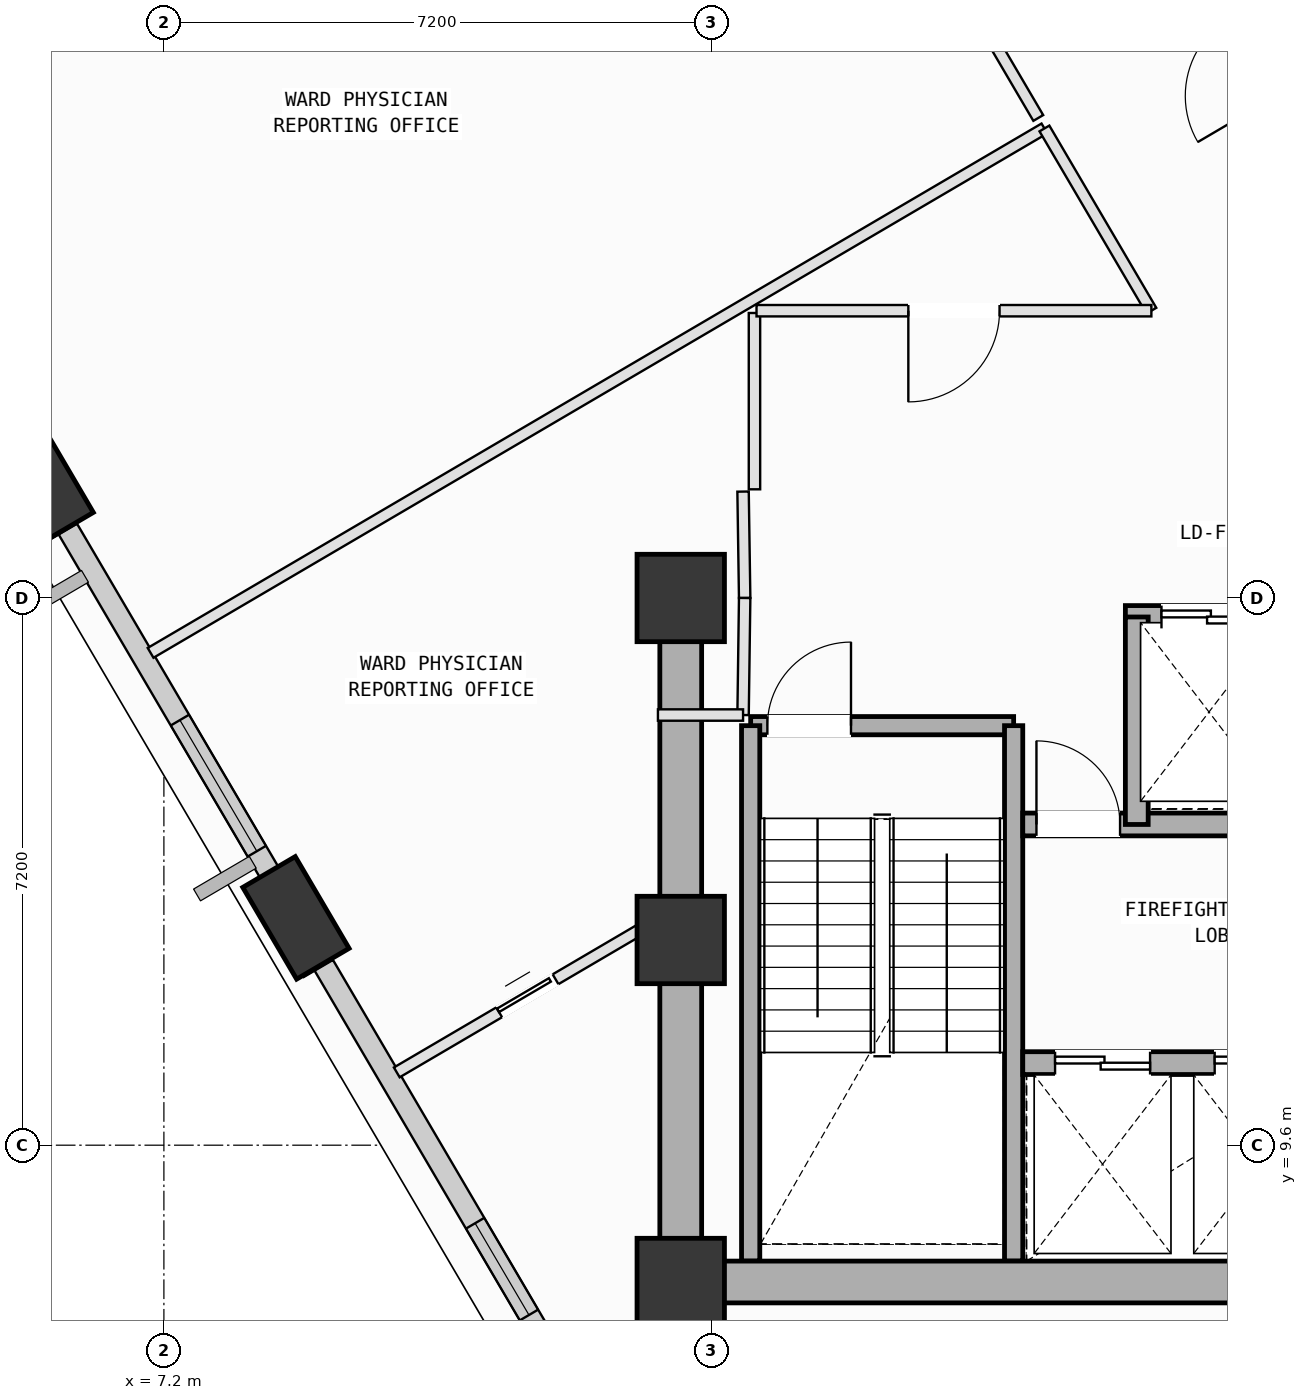
"""IFC4 building model, lengths in metres.
Left out: names, types, materials, properties, quantities, classifications, styles, units other than length and angle.
Written with IfcOpenShell. Run it as: python <this file> out.ifc"""

import sys

from ifc_helpers import new_model, si_unit, direction, frame, frame_2d, origin, origin_2d, place, context, subcontext, project, spatial, rectangle, extrude, element, fill, save


model = new_model("IFC4")
c1 = context("Model", 3, precision=1e-05, world=origin(), true_north=direction((0.0, 1.0)))
c2 = subcontext(c1, "Body", "Model", "MODEL_VIEW")
j1 = project(units=[si_unit("LENGTHUNIT", "METRE"), si_unit("PLANEANGLEUNIT", "RADIAN")], contexts=[c1])
p1 = place(None, origin())
s1 = spatial("IfcSite", under=j1, at=p1, CompositionType="ELEMENT")
p2 = place(p1, origin())
s2 = spatial("IfcBuilding", under=s1, at=p2, CompositionType="ELEMENT")
p3 = place(p2, frame((0.0, 0.0, 153.8)))
s3 = spatial("IfcBuildingStorey", under=s2, at=p3, CompositionType="ELEMENT", Elevation=153.8)
for number, where, z_axis, x_axis in (
    (1, (14.0, 7.8, 0.0), (0.0, 0.0, 1.0), (1.0, 0.0, 0.0)),
    (2, (14.0, 12.3, 0.0), (0.0, 0.0, 1.0), (1.0, 0.0, 0.0)),
    (3, (14.0, 16.8, 0.0), (0.0, 0.0, 1.0), (1.0, 0.0, 0.0)),
):
    element("IfcColumn", number, at=place(p3, frame(where, z_axis=z_axis, x_axis=x_axis)), inside=s3, PredefinedType="COLUMN", context=c2, shape_type="SweptSolid", body=[
        extrude(rectangle(XDim=1.15, YDim=1.15, at=origin_2d()), origin(), (0.0, 0.0, 1.0), 4.0),
    ])
p4 = place(p3, frame((5.572, 18.327, 0.002), z_axis=(0.027600932287, -0.115135317539, 0.992966287037), x_axis=(-0.69174719103, 0.714882822887, 0.102119406791)))
e4 = element("IfcColumn", 4, at=p4, inside=s3, PredefinedType="COLUMN", context=c2, shape_type="SweptSolid", body=[
    extrude(rectangle(XDim=1.4, YDim=0.8, at=origin_2d()), origin(), (0.0, 0.0, 1.0), 4.025),
])
p5 = place(p3, frame((8.937, 12.591, 0.002), z_axis=(0.051167990151, -0.101122030358, 0.993557331894), x_axis=(-0.838431150667, 0.536170027731, 0.097749204363)))
e5 = element("IfcColumn", 5, at=p5, inside=s3, PredefinedType="COLUMN", context=c2, shape_type="SweptSolid", body=[
    extrude(rectangle(XDim=1.4, YDim=0.8, at=origin_2d()), origin(), (0.0, 0.0, 1.0), 4.022),
])
p6 = place(p3, frame((8.802, 12.823, 0.0), z_axis=(0.0, 0.0, 1.0), x_axis=(-0.506043695411, 0.862507842477, 0.0)))
e6 = element("IfcWall", 6, at=p6, inside=s3, PredefinedType="SOLIDWALL", context=c2, shape_type="SweptSolid", body=[
    extrude(rectangle(XDim=5.662, YDim=0.28, at=frame_2d((2.831, 0.0))), origin(), (0.0, 0.0, 1.0), 3.165),
])
p7 = place(p6, frame((0.748, 0.0, 0.75)))
e7 = element("IfcOpeningElement", 7, at=p7, cuts=e6, PredefinedType="OPENING", context=c2, shape_type="SweptSolid", body=[
    extrude(rectangle(XDim=2.0, YDim=1.95, at=frame_2d((1.0, 0.975))), frame((0.0, 0.15, 0.0), z_axis=(0.0, -1.0, 0.0), x_axis=(1.0, 0.0, 0.0)), (0.0, 0.0, 1.0), 0.3),
])
p8 = place(p3, frame((13.028, 5.619, 0.0), z_axis=(0.0, 0.0, 1.0), x_axis=(-0.506051462326, 0.862503285488, 0.0)))
e8 = element("IfcWall", 8, at=p8, inside=s3, PredefinedType="SOLIDWALL", context=c2, shape_type="SweptSolid", body=[
    extrude(rectangle(XDim=7.36, YDim=0.28, at=frame_2d((3.68, 0.0))), origin(), (0.0, 0.0, 1.0), 3.165),
])
p9 = place(p8, frame((2.025, 0.0, 0.75)))
e9 = element("IfcOpeningElement", 9, at=p9, cuts=e8, PredefinedType="OPENING", context=c2, shape_type="SweptSolid", body=[
    extrude(rectangle(XDim=1.4, YDim=1.85, at=frame_2d((0.7, 0.925))), frame((0.0, 0.15, 0.0), z_axis=(0.0, -1.0, 0.0), x_axis=(1.0, 0.0, 0.0)), (0.0, 0.0, 1.0), 0.3),
])
p10 = place(p3, frame((14.92, 15.12, 0.0), z_axis=(0.0, 0.0, 1.0), x_axis=(1.0, 0.0, 0.0)))
e10 = element("IfcWall", 10, at=p10, inside=s3, PredefinedType="SOLIDWALL", context=c2, shape_type="SweptSolid", body=[
    extrude(rectangle(XDim=3.46, YDim=0.24, at=frame_2d((1.73, 0.0))), origin(), (0.0, 0.0, 1.0), 3.78),
])
p11 = place(p10, frame((0.22, 0.0, 0.0)))
e11 = element("IfcOpeningElement", 11, at=p11, cuts=e10, PredefinedType="OPENING", context=c2, shape_type="SweptSolid", body=[
    extrude(rectangle(XDim=1.1, YDim=2.15, at=frame_2d((0.55, 1.075))), frame((0.0, 0.13, 0.0), z_axis=(0.0, -1.0, 0.0), x_axis=(1.0, 0.0, 0.0)), (0.0, 0.0, 1.0), 0.26),
])
for number, where, z_axis, x_axis in (
    (12, (18.38, 15.12, 0.0), (0.0, 0.0, 1.0), (0.0, -1.0, 0.0)),
    (13, (14.92, 8.075, 0.0), (0.0, 0.0, 1.0), (0.0, 1.0, 0.0)),
):
    element("IfcWall", number, at=place(p3, frame(where, z_axis=z_axis, x_axis=x_axis)), inside=s3, PredefinedType="SOLIDWALL", context=c2, shape_type="SweptSolid", body=[
        extrude(rectangle(XDim=7.045, YDim=0.24, at=frame_2d((3.522, 0.0))), origin(), (0.0, 0.0, 1.0), 3.78),
    ])
p12 = place(p3, frame((14.0, 7.8, 0.0), z_axis=(0.0, 0.0, 1.0), x_axis=(1.0, 0.0, 0.0)))
e14 = element("IfcWall", 14, at=p12, inside=s3, PredefinedType="SHEAR", context=c2, shape_type="SweptSolid", body=[
    extrude(rectangle(XDim=10.8, YDim=0.55, at=frame_2d((5.4, 0.0))), origin(), (0.0, 0.0, 1.0), 3.78),
])
p13 = place(p3, frame((14.0, 16.8, 0.0), z_axis=(0.0, 0.0, 1.0), x_axis=(0.0, -1.0, 0.0)))
e15 = element("IfcWall", 15, at=p13, inside=s3, PredefinedType="SHEAR", context=c2, shape_type="SweptSolid", body=[
    extrude(rectangle(XDim=9.0, YDim=0.55, at=frame_2d((4.5, 0.0))), origin(), (0.0, 0.0, 1.0), 3.78),
])
p14 = place(p3, frame((19.85, 16.55, 0.0), z_axis=(0.0, 0.0, 1.0), x_axis=(1.0, 0.0, 0.0)))
e16 = element("IfcWall", 16, at=p14, inside=s3, PredefinedType="SOLIDWALL", context=c2, shape_type="SweptSolid", body=[
    extrude(rectangle(XDim=4.375, YDim=0.3, at=frame_2d((2.188, 0.0))), origin(), (0.0, 0.0, 1.0), 3.78),
])
p15 = place(p14, frame((0.475, 0.0, 0.0)))
e17 = element("IfcOpeningElement", 17, at=p15, cuts=e16, PredefinedType="OPENING", context=c2, shape_type="SweptSolid", body=[
    extrude(rectangle(XDim=1.25, YDim=2.18, at=frame_2d((0.625, 1.09))), frame((0.0, 0.16, 0.0), z_axis=(0.0, -1.0, 0.0), x_axis=(1.0, 0.0, 0.0)), (0.0, 0.0, 1.0), 0.32),
])
p16 = place(p14, frame((2.49, 0.0, 0.0)))
e18 = element("IfcOpeningElement", 18, at=p16, cuts=e16, PredefinedType="OPENING", context=c2, shape_type="SweptSolid", body=[
    extrude(rectangle(XDim=1.02, YDim=2.12, at=frame_2d((0.51, 1.06))), frame((0.0, 0.16, 0.0), z_axis=(0.0, -1.0, 0.0), x_axis=(1.0, 0.0, 0.0)), (0.0, 0.0, 1.0), 0.32),
])
p17 = place(p3, frame((18.5, 10.68, 0.0), z_axis=(0.0, 0.0, 1.0), x_axis=(1.0, 0.0, 0.0)))
e19 = element("IfcWall", 19, at=p17, inside=s3, PredefinedType="SOLIDWALL", context=c2, shape_type="SweptSolid", body=[
    extrude(rectangle(XDim=5.3, YDim=0.3, at=frame_2d((2.65, 0.0))), origin(), (0.0, 0.0, 1.0), 3.78),
])
p18 = place(p17, frame((4.22, 0.0, 0.0)))
e20 = element("IfcOpeningElement", 20, at=p18, cuts=e19, PredefinedType="OPENING", context=c2, shape_type="SweptSolid", body=[
    extrude(rectangle(XDim=0.86, YDim=2.06, at=frame_2d((0.43, 1.03))), frame((0.0, 0.16, 0.0), z_axis=(0.0, -1.0, 0.0), x_axis=(1.0, 0.0, 0.0)), (0.0, 0.0, 1.0), 0.32),
])
p19 = place(p17, frame((0.425, 0.0, 0.0)))
e21 = element("IfcOpeningElement", 21, at=p19, cuts=e19, PredefinedType="OPENING", context=c2, shape_type="SweptSolid", body=[
    extrude(rectangle(XDim=1.25, YDim=2.18, at=frame_2d((0.625, 1.09))), frame((0.0, 0.16, 0.0), z_axis=(0.0, -1.0, 0.0), x_axis=(1.0, 0.0, 0.0)), (0.0, 0.0, 1.0), 0.32),
])
p20 = place(p17, frame((2.525, 0.0, 0.0)))
e22 = element("IfcOpeningElement", 22, at=p20, cuts=e19, PredefinedType="OPENING", context=c2, shape_type="SweptSolid", body=[
    extrude(rectangle(XDim=1.25, YDim=2.18, at=frame_2d((0.625, 1.09))), frame((0.0, 0.16, 0.0), z_axis=(0.0, -1.0, 0.0), x_axis=(1.0, 0.0, 0.0)), (0.0, 0.0, 1.0), 0.32),
])
p21 = place(p3, frame((18.5, 13.82, 0.0), z_axis=(0.0, 0.0, 1.0), x_axis=(1.0, 0.0, 0.0)))
e23 = element("IfcWall", 23, at=p21, inside=s3, PredefinedType="SOLIDWALL", context=c2, shape_type="SweptSolid", body=[
    extrude(rectangle(XDim=5.3, YDim=0.3, at=frame_2d((2.65, 0.0))), origin(), (0.0, 0.0, 1.0), 3.78),
])
p22 = place(p21, frame((0.18, 0.0, 0.0)))
e24 = element("IfcOpeningElement", 24, at=p22, cuts=e23, PredefinedType="OPENING", context=c2, shape_type="SweptSolid", body=[
    extrude(rectangle(XDim=1.1, YDim=2.15, at=frame_2d((0.55, 1.075))), frame((0.0, 0.16, 0.0), z_axis=(0.0, -1.0, 0.0), x_axis=(1.0, 0.0, 0.0)), (0.0, 0.0, 1.0), 0.32),
])
p23 = place(p3, frame((20.0, 13.82, 0.0), z_axis=(0.0, 0.0, 1.0), x_axis=(0.0, 1.0, 0.0)))
e25 = element("IfcWall", 25, at=p23, inside=s3, PredefinedType="SOLIDWALL", context=c2, shape_type="SweptSolid", body=[
    extrude(rectangle(XDim=2.73, YDim=0.3, at=frame_2d((1.365, 0.0))), origin(), (0.0, 0.0, 1.0), 3.78),
])
p24 = place(p3, frame((23.214, 7.675, 0.0), z_axis=(0.0, 0.0, 1.0), x_axis=(-0.862480430276, -0.506090414245, 0.0)))
e26 = element("IfcWall", 26, at=p24, inside=s3, PredefinedType="PARTITIONING", context=c2, shape_type="SweptSolid", body=[
    extrude(rectangle(XDim=9.712, YDim=0.15, at=frame_2d((4.856, 0.0))), origin(), (0.0, 0.0, 1.0), 3.78),
])
p25 = place(p3, frame((10.264, 10.558, 0.0), z_axis=(0.0, 0.0, 1.0), x_axis=(0.862518129621, 0.506026161453, 0.0)))
e27 = element("IfcWall", 27, at=p25, inside=s3, PredefinedType="PARTITIONING", context=c2, shape_type="SweptSolid", body=[
    extrude(rectangle(XDim=3.984, YDim=0.15, at=frame_2d((1.992, 0.0))), origin(), (0.0, 0.0, 1.0), 3.78),
])
p26 = place(p25, frame((1.562, 0.0, 0.0)))
e28 = element("IfcOpeningElement", 28, at=p26, cuts=e27, PredefinedType="OPENING", context=c2, shape_type="SweptSolid", body=[
    extrude(rectangle(XDim=0.86, YDim=2.06, at=frame_2d((0.43, 1.03))), frame((0.0, 0.085, 0.0), z_axis=(0.0, -1.0, 0.0), x_axis=(1.0, 0.0, 0.0)), (0.0, 0.0, 1.0), 0.17),
])
p27 = place(p3, frame((14.97, 20.55, 0.0), z_axis=(0.0, 0.0, 1.0), x_axis=(0.0, -1.0, 0.0)))
e29 = element("IfcWall", 29, at=p27, inside=s3, PredefinedType="PARTITIONING", context=c2, shape_type="SweptSolid", body=[
    extrude(rectangle(XDim=2.32, YDim=0.15, at=frame_2d((1.16, 0.0))), origin(), (0.0, 0.0, 1.0), 3.78),
])
p28 = place(p3, frame((14.82, 18.2, 0.0), z_axis=(0.0, 0.0, 1.0), x_axis=(0.01499656939, -0.99988754513, 0.0)))
e30 = element("IfcWall", 30, at=p28, inside=s3, PredefinedType="PARTITIONING", context=c2, shape_type="SweptSolid", body=[
    extrude(rectangle(XDim=1.4, YDim=0.15, at=frame_2d((0.7, 0.0))), origin(), (0.0, 0.0, 1.0), 3.78),
])
p29 = place(p3, frame((14.841, 16.8, 0.0), z_axis=(0.0, 0.0, 1.0), x_axis=(-0.01363221443, -0.999907077048, 0.0)))
e31 = element("IfcWall", 31, at=p29, inside=s3, PredefinedType="PARTITIONING", context=c2, shape_type="SweptSolid", body=[
    extrude(rectangle(XDim=1.54, YDim=0.15, at=frame_2d((0.77, 0.0))), origin(), (0.0, 0.0, 1.0), 3.78),
])
p30 = place(p3, frame((14.82, 15.26, 0.0), z_axis=(0.0, 0.0, 1.0), x_axis=(-1.0, 0.0, 0.0)))
e32 = element("IfcWall", 32, at=p30, inside=s3, PredefinedType="PARTITIONING", context=c2, shape_type="SweptSolid", body=[
    extrude(rectangle(XDim=1.12, YDim=0.15, at=frame_2d((0.56, 0.0))), origin(), (0.0, 0.0, 1.0), 3.78),
])
p31 = place(p3, frame((9.105, 11.851, 0.0), z_axis=(0.0, 0.0, 1.0), x_axis=(-0.506288159859, 0.862364365675, 0.0)))
e33 = element("IfcWall", 33, at=p31, inside=s3, PredefinedType="PARTITIONING", context=c2, shape_type="SweptSolid", body=[
    extrude(rectangle(XDim=0.991, YDim=0.15, at=frame_2d((0.496, 0.0))), origin(), (0.0, 0.0, 1.0), 3.165),
])
p32 = place(p3, frame((7.025, 16.078, 0.0), z_axis=(0.0, 0.0, 1.0), x_axis=(0.862494790815, 0.506065940186, 0.0)))
e34 = element("IfcWall", 34, at=p32, inside=s3, PredefinedType="PARTITIONING", context=c2, shape_type="SweptSolid", body=[
    extrude(rectangle(XDim=13.635, YDim=0.15, at=frame_2d((6.817, 0.0))), origin(), (0.0, 0.0, 1.0), 3.78),
])
p33 = place(p3, frame((18.785, 22.978, 0.0), z_axis=(0.0, 0.0, 1.0), x_axis=(0.506064259936, -0.862495776694, 0.0)))
e35 = element("IfcWall", 35, at=p33, inside=s3, PredefinedType="PARTITIONING", context=c2, shape_type="SweptSolid", body=[
    extrude(rectangle(XDim=2.78, YDim=0.15, at=frame_2d((1.39, 0.0))), origin(), (0.0, 0.0, 1.0), 3.78),
])
p34 = place(p3, frame((20.192, 20.58, 0.0), z_axis=(0.0, 0.0, 1.0), x_axis=(-1.0, 0.0, 0.0)))
e36 = element("IfcWall", 36, at=p34, inside=s3, PredefinedType="PARTITIONING", context=c2, shape_type="SweptSolid", body=[
    extrude(rectangle(XDim=5.195, YDim=0.15, at=frame_2d((2.597, 0.0))), origin(), (0.0, 0.0, 1.0), 3.78),
])
p35 = place(p34, frame((1.998, 0.0, 0.0)))
e37 = element("IfcOpeningElement", 37, at=p35, cuts=e36, PredefinedType="OPENING", context=c2, shape_type="SweptSolid", body=[
    extrude(rectangle(XDim=1.2, YDim=2.15, at=frame_2d((0.6, 1.075))), frame((0.0, 0.085, 0.0), z_axis=(0.0, -1.0, 0.0), x_axis=(1.0, 0.0, 0.0)), (0.0, 0.0, 1.0), 0.17),
])
p36 = place(p3, frame((2.072, 23.839, 0.0), z_axis=(0.0, 0.0, 1.0), x_axis=(0.862523991111, 0.506016170452, 0.0)))
e38 = element("IfcWall", 38, at=p36, inside=s3, PredefinedType="PARTITIONING", context=c2, shape_type="SweptSolid", body=[
    extrude(rectangle(XDim=13.98, YDim=0.15, at=frame_2d((6.99, 0.0))), origin(), (0.0, 0.0, 1.0), 3.78),
])
p37 = place(p3, frame((14.13, 30.913, 0.0), z_axis=(0.0, 0.0, 1.0), x_axis=(0.506007110353, -0.862529306327, 0.0)))
e39 = element("IfcWall", 39, at=p37, inside=s3, PredefinedType="PARTITIONING", context=c2, shape_type="SweptSolid", body=[
    extrude(rectangle(XDim=9.04, YDim=0.15, at=frame_2d((4.52, 0.0))), origin(), (0.0, 0.0, 1.0), 3.78),
])
p38 = place(p37, frame((3.92, 0.0, 0.0)))
e40 = element("IfcOpeningElement", 40, at=p38, cuts=e39, PredefinedType="OPENING", context=c2, shape_type="SweptSolid", body=[
    extrude(rectangle(XDim=1.2, YDim=2.15, at=frame_2d((0.6, 1.075))), frame((0.0, 0.085, 0.0), z_axis=(0.0, -1.0, 0.0), x_axis=(1.0, 0.0, 0.0)), (0.0, 0.0, 1.0), 0.17),
])
p39 = place(p3, frame((5.738, 17.59, 0.0), z_axis=(0.0, 0.0, 1.0), x_axis=(-0.506911529667, 0.861998086478, 0.0)))
e41 = element("IfcWall", 41, at=p39, inside=s3, PredefinedType="PARTITIONING", context=c2, shape_type="SweptSolid", body=[
    extrude(rectangle(XDim=0.982, YDim=0.15, at=frame_2d((0.491, 0.0))), origin(), (0.0, 0.0, 1.0), 3.165),
])
p40 = place(p3, frame((23.098, 21.259, 0.0), z_axis=(0.0, 0.0, 1.0), x_axis=(-0.506011476282, 0.862526745018, 0.0)))
e42 = element("IfcWall", 42, at=p40, inside=s3, PredefinedType="PARTITIONING", context=c2, shape_type="SweptSolid", body=[
    extrude(rectangle(XDim=6.18, YDim=0.15, at=frame_2d((3.09, 0.0))), origin(), (0.0, 0.0, 1.0), 3.78),
])
p41 = place(p40, frame((2.49, 0.0, 0.0)))
e43 = element("IfcOpeningElement", 43, at=p41, cuts=e42, PredefinedType="OPENING", context=c2, shape_type="SweptSolid", body=[
    extrude(rectangle(XDim=1.2, YDim=2.15, at=frame_2d((0.6, 1.075))), frame((0.0, 0.085, 0.0), z_axis=(0.0, -1.0, 0.0), x_axis=(1.0, 0.0, 0.0)), (0.0, 0.0, 1.0), 0.17),
])
p42 = place(p7, origin())
e44 = element("IfcWindow", 44, at=p42, inside=s3, PartitioningType="SINGLE_PANEL", PredefinedType="WINDOW", context=c2, shape_type="SweptSolid", body=[
    extrude(rectangle(XDim=2.0, YDim=1.95, at=frame_2d((1.0, 0.975))), frame((0.0, 0.03, 0.0), z_axis=(0.0, -1.0, 0.0), x_axis=(1.0, 0.0, 0.0)), (0.0, 0.0, 1.0), 0.06),
])
fill(e7, e44)
p43 = place(p9, origin())
e45 = element("IfcWindow", 45, at=p43, inside=s3, PartitioningType="SINGLE_PANEL", PredefinedType="WINDOW", context=c2, shape_type="SweptSolid", body=[
    extrude(rectangle(XDim=1.4, YDim=1.85, at=frame_2d((0.7, 0.925))), frame((0.0, 0.03, 0.0), z_axis=(0.0, -1.0, 0.0), x_axis=(1.0, 0.0, 0.0)), (0.0, 0.0, 1.0), 0.06),
])
fill(e9, e45)
p44 = place(p11, origin())
e46 = element("IfcDoor", 46, at=p44, inside=s3, OperationType="SINGLE_SWING_RIGHT", PredefinedType="DOOR", context=c2, shape_type="SweptSolid", body=[
    extrude(rectangle(XDim=1.1, YDim=2.15, at=frame_2d((0.55, 1.075))), frame((0.0, 0.025, 0.0), z_axis=(0.0, -1.0, 0.0), x_axis=(1.0, 0.0, 0.0)), (0.0, 0.0, 1.0), 0.05),
])
fill(e11, e46)
p45 = place(p22, origin())
e47 = element("IfcDoor", 47, at=p45, inside=s3, OperationType="SINGLE_SWING_LEFT", PredefinedType="DOOR", context=c2, shape_type="SweptSolid", body=[
    extrude(rectangle(XDim=1.1, YDim=2.15, at=frame_2d((0.55, 1.075))), frame((0.0, 0.025, 0.0), z_axis=(0.0, -1.0, 0.0), x_axis=(1.0, 0.0, 0.0)), (0.0, 0.0, 1.0), 0.05),
])
fill(e24, e47)
p46 = place(p19, origin())
e48 = element("IfcDoor", 48, at=p46, inside=s3, OperationType="DOUBLE_DOOR_SLIDING", PredefinedType="DOOR", context=c2, shape_type="SweptSolid", body=[
    extrude(rectangle(XDim=1.25, YDim=2.18, at=frame_2d((0.625, 1.09))), frame((0.0, 0.025, 0.0), z_axis=(0.0, -1.0, 0.0), x_axis=(1.0, 0.0, 0.0)), (0.0, 0.0, 1.0), 0.05),
])
fill(e21, e48)
p47 = place(p20, origin())
e49 = element("IfcDoor", 49, at=p47, inside=s3, OperationType="DOUBLE_DOOR_SLIDING", PredefinedType="DOOR", context=c2, shape_type="SweptSolid", body=[
    extrude(rectangle(XDim=1.25, YDim=2.18, at=frame_2d((0.625, 1.09))), frame((0.0, 0.025, 0.0), z_axis=(0.0, -1.0, 0.0), x_axis=(1.0, 0.0, 0.0)), (0.0, 0.0, 1.0), 0.05),
])
fill(e22, e49)
p48 = place(p15, origin())
e50 = element("IfcDoor", 50, at=p48, inside=s3, OperationType="DOUBLE_DOOR_SLIDING", PredefinedType="DOOR", context=c2, shape_type="SweptSolid", body=[
    extrude(rectangle(XDim=1.25, YDim=2.18, at=frame_2d((0.625, 1.09))), frame((0.0, 0.025, 0.0), z_axis=(0.0, -1.0, 0.0), x_axis=(1.0, 0.0, 0.0)), (0.0, 0.0, 1.0), 0.05),
])
fill(e17, e50)
p49 = place(p35, origin())
e51 = element("IfcDoor", 51, at=p49, inside=s3, OperationType="SINGLE_SWING_RIGHT", PredefinedType="DOOR", context=c2, shape_type="SweptSolid", body=[
    extrude(rectangle(XDim=1.2, YDim=2.15, at=frame_2d((0.6, 1.075))), frame((0.0, 0.025, 0.0), z_axis=(0.0, -1.0, 0.0), x_axis=(1.0, 0.0, 0.0)), (0.0, 0.0, 1.0), 0.05),
])
fill(e37, e51)
p50 = place(p26, origin())
e52 = element("IfcDoor", 52, at=p50, inside=s3, OperationType="SLIDING_TO_LEFT", PredefinedType="DOOR", context=c2, shape_type="SweptSolid", body=[
    extrude(rectangle(XDim=0.86, YDim=2.06, at=frame_2d((0.43, 1.03))), frame((0.0, 0.025, 0.0), z_axis=(0.0, -1.0, 0.0), x_axis=(1.0, 0.0, 0.0)), (0.0, 0.0, 1.0), 0.05),
])
fill(e28, e52)
save(model, sys.argv[1])
